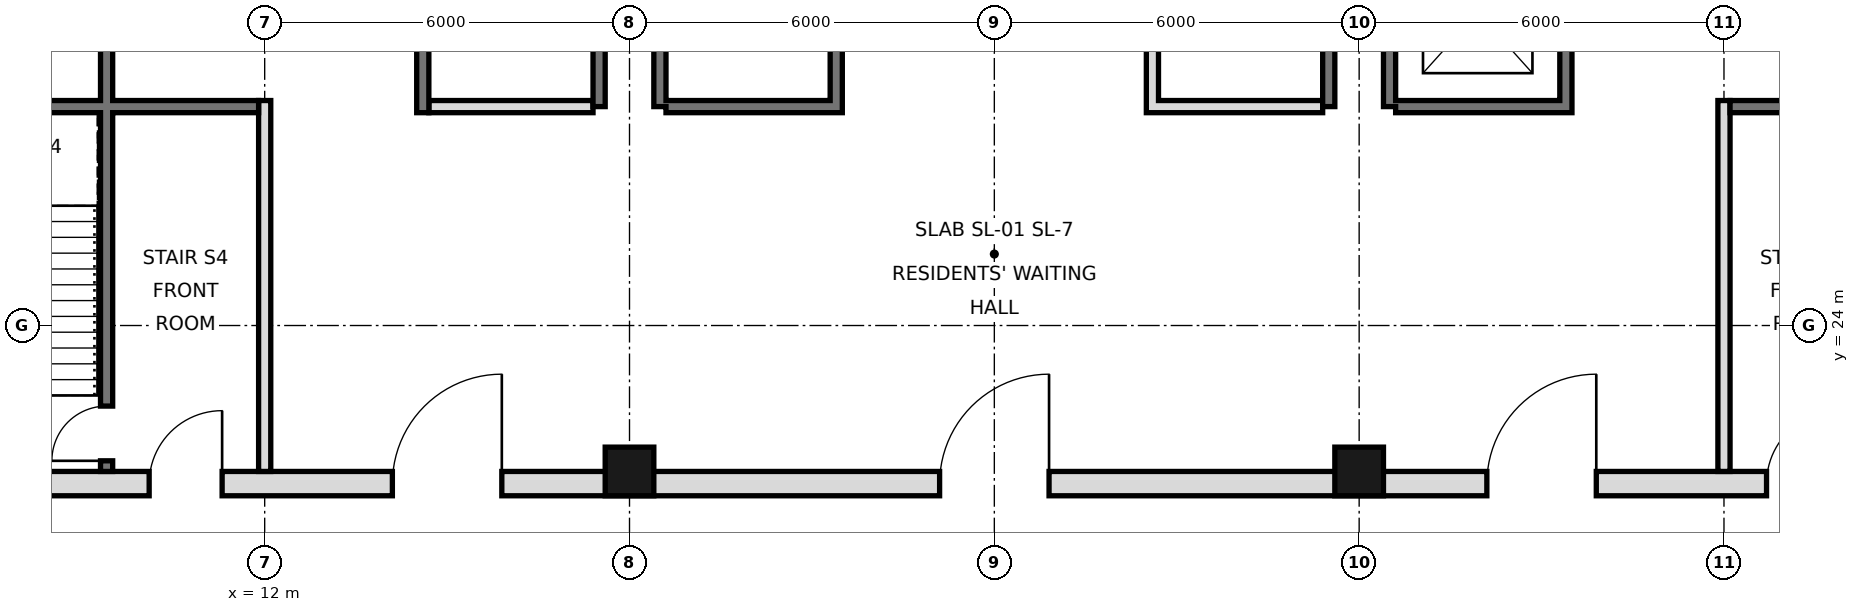
"""IFC4 building model, lengths in metres.
Left out: names, types, materials, properties, quantities, classifications, styles, units other than length and angle.
Written with IfcOpenShell. Run it as: python <this file> out.ifc"""

import sys

from ifc_helpers import new_model, si_unit, direction, frame, frame_2d, origin, origin_2d, place, context, subcontext, project, spatial, rectangle, hollow_rectangle, extrude, element, fill, save


model = new_model("IFC4")
c1 = context("Model", 3, precision=1e-05, world=origin(), true_north=direction((0.0, 1.0)))
c2 = subcontext(c1, "Body", "Model", "MODEL_VIEW")
j1 = project(units=[si_unit("LENGTHUNIT", "METRE"), si_unit("PLANEANGLEUNIT", "RADIAN")], contexts=[c1])
p1 = place(None, origin())
s1 = spatial("IfcSite", under=j1, at=p1, CompositionType="ELEMENT")
p2 = place(p1, origin())
s2 = spatial("IfcBuilding", under=s1, at=p2, CompositionType="ELEMENT")
p3 = place(p2, frame((0.0, 0.0, 181.6)))
s3 = spatial("IfcBuildingStorey", under=s2, at=p3, CompositionType="ELEMENT", Elevation=181.6)
for number, where, z_axis, x_axis in (
    (1, (18.0, 21.6, 0.0), (0.0, 0.0, 1.0), (1.0, 0.0, 0.0)),
    (2, (30.0, 21.6, 0.0), (0.0, 0.0, 1.0), (1.0, 0.0, 0.0)),
):
    element("IfcColumn", number, at=place(p3, frame(where, z_axis=z_axis, x_axis=x_axis)), inside=s3, PredefinedType="COLUMN", context=c2, shape_type="SweptSolid", body=[
        extrude(hollow_rectangle(XDim=0.8, YDim=0.8, WallThickness=0.045, at=origin_2d()), origin(), (0.0, 0.0, 1.0), 4.4),
    ])
for number, where, z_axis, x_axis in (
    (3, (17.5, 27.6, 0.0), (0.0, 0.0, 1.0), (0.0, 1.0, 0.0)),
    (4, (18.5, 27.6, 0.0), (0.0, 0.0, 1.0), (0.0, 1.0, 0.0)),
    (5, (29.5, 27.6, 0.0), (0.0, 0.0, 1.0), (0.0, 1.0, 0.0)),
    (6, (30.5, 27.6, 0.0), (0.0, 0.0, 1.0), (0.0, 1.0, 0.0)),
):
    element("IfcWall", number, at=place(p3, frame(where, z_axis=z_axis, x_axis=x_axis)), inside=s3, PredefinedType="SOLIDWALL", context=c2, shape_type="SweptSolid", body=[
        extrude(rectangle(XDim=17.5, YDim=0.2, at=frame_2d((8.75, 0.0))), origin(), (0.0, 0.0, 1.0), 4.1),
    ])
p4 = place(p3, frame((5.6, 21.4, 0.0), z_axis=(0.0, 0.0, 1.0), x_axis=(1.0, 0.0, 0.0)))
e7 = element("IfcWall", 7, at=p4, inside=s3, PredefinedType="SOLIDWALL", context=c2, shape_type="SweptSolid", body=[
    extrude(rectangle(XDim=36.8, YDim=0.4, at=frame_2d((18.4, 0.0))), origin(), (0.0, 0.0, 1.0), 4.1),
])
p5 = place(p4, frame((8.5, 0.0, 0.0)))
e8 = element("IfcOpeningElement", 8, at=p5, cuts=e7, PredefinedType="OPENING", context=c2, shape_type="SweptSolid", body=[
    extrude(rectangle(XDim=1.8, YDim=2.1, at=frame_2d((0.9, 1.05))), frame((0.0, 0.21, 0.0), z_axis=(0.0, -1.0, 0.0), x_axis=(1.0, 0.0, 0.0)), (0.0, 0.0, 1.0), 0.42),
])
p6 = place(p4, frame((17.5, 0.0, 0.0)))
e9 = element("IfcOpeningElement", 9, at=p6, cuts=e7, PredefinedType="OPENING", context=c2, shape_type="SweptSolid", body=[
    extrude(rectangle(XDim=1.8, YDim=2.1, at=frame_2d((0.9, 1.05))), frame((0.0, 0.21, 0.0), z_axis=(0.0, -1.0, 0.0), x_axis=(1.0, 0.0, 0.0)), (0.0, 0.0, 1.0), 0.42),
])
p7 = place(p4, frame((26.5, 0.0, 0.0)))
e10 = element("IfcOpeningElement", 10, at=p7, cuts=e7, PredefinedType="OPENING", context=c2, shape_type="SweptSolid", body=[
    extrude(rectangle(XDim=1.8, YDim=2.1, at=frame_2d((0.9, 1.05))), frame((0.0, 0.21, 0.0), z_axis=(0.0, -1.0, 0.0), x_axis=(1.0, 0.0, 0.0)), (0.0, 0.0, 1.0), 0.42),
])
p8 = place(p4, frame((4.5, 0.0, 0.0)))
e11 = element("IfcOpeningElement", 11, at=p8, cuts=e7, PredefinedType="OPENING", context=c2, shape_type="SweptSolid", body=[
    extrude(rectangle(XDim=1.2, YDim=2.1, at=frame_2d((0.6, 1.05))), frame((0.0, 0.21, 0.0), z_axis=(0.0, -1.0, 0.0), x_axis=(1.0, 0.0, 0.0)), (0.0, 0.0, 1.0), 0.42),
])
p9 = place(p4, frame((31.1, 0.0, 0.0)))
e12 = element("IfcOpeningElement", 12, at=p9, cuts=e7, PredefinedType="OPENING", context=c2, shape_type="SweptSolid", body=[
    extrude(rectangle(XDim=1.2, YDim=2.1, at=frame_2d((0.6, 1.05))), frame((0.0, 0.21, 0.0), z_axis=(0.0, -1.0, 0.0), x_axis=(1.0, 0.0, 0.0)), (0.0, 0.0, 1.0), 0.42),
])
p10 = place(p3, frame((12.0, 21.6, 0.0), z_axis=(0.0, 0.0, 1.0), x_axis=(0.0, 1.0, 0.0)))
e13 = element("IfcWall", 13, at=p10, inside=s3, PredefinedType="PARTITIONING", context=c2, shape_type="SweptSolid", body=[
    extrude(rectangle(XDim=6.1, YDim=0.2, at=frame_2d((3.05, 0.0))), origin(), (0.0, 0.0, 1.0), 4.1),
])
p11 = place(p3, frame((14.6, 27.5, 0.0), z_axis=(0.0, 0.0, 1.0), x_axis=(0.0, 1.0, 0.0)))
e14 = element("IfcWall", 14, at=p11, inside=s3, PredefinedType="SOLIDWALL", context=c2, shape_type="SweptSolid", body=[
    extrude(rectangle(XDim=17.5, YDim=0.2, at=frame_2d((8.75, 0.0))), origin(), (0.0, 0.0, 1.0), 4.1),
])
p12 = place(p11, frame((15.4, 0.0, 0.0)))
e15 = element("IfcOpeningElement", 15, at=p12, cuts=e14, PredefinedType="OPENING", context=c2, shape_type="SweptSolid", body=[
    extrude(rectangle(XDim=1.1, YDim=2.1, at=frame_2d((0.55, 1.05))), frame((0.0, 0.11, 0.0), z_axis=(0.0, -1.0, 0.0), x_axis=(1.0, 0.0, 0.0)), (0.0, 0.0, 1.0), 0.22),
])
p13 = place(p11, frame((2.7, 0.0, 0.0)))
e16 = element("IfcOpeningElement", 16, at=p13, cuts=e14, PredefinedType="OPENING", context=c2, shape_type="SweptSolid", body=[
    extrude(rectangle(XDim=1.0, YDim=2.1, at=frame_2d((0.5, 1.05))), frame((0.0, 0.11, 0.0), z_axis=(0.0, -1.0, 0.0), x_axis=(1.0, 0.0, 0.0)), (0.0, 0.0, 1.0), 0.22),
])
p14 = place(p11, frame((9.9, 0.0, 0.0)))
e17 = element("IfcOpeningElement", 17, at=p14, cuts=e14, PredefinedType="OPENING", context=c2, shape_type="SweptSolid", body=[
    extrude(rectangle(XDim=0.9, YDim=2.1, at=frame_2d((0.45, 1.05))), frame((0.0, 0.11, 0.0), z_axis=(0.0, -1.0, 0.0), x_axis=(1.0, 0.0, 0.0)), (0.0, 0.0, 1.0), 0.22),
])
p15 = place(p3, frame((21.4, 27.5, 0.0), z_axis=(0.0, 0.0, 1.0), x_axis=(0.0, 1.0, 0.0)))
e18 = element("IfcWall", 18, at=p15, inside=s3, PredefinedType="SOLIDWALL", context=c2, shape_type="SweptSolid", body=[
    extrude(rectangle(XDim=17.5, YDim=0.2, at=frame_2d((8.75, 0.0))), origin(), (0.0, 0.0, 1.0), 4.1),
])
p16 = place(p15, frame((9.8, 0.0, 0.0)))
e19 = element("IfcOpeningElement", 19, at=p16, cuts=e18, PredefinedType="OPENING", context=c2, shape_type="SweptSolid", body=[
    extrude(rectangle(XDim=1.0, YDim=2.1, at=frame_2d((0.5, 1.05))), frame((0.0, 0.11, 0.0), z_axis=(0.0, -1.0, 0.0), x_axis=(1.0, 0.0, 0.0)), (0.0, 0.0, 1.0), 0.22),
])
p17 = place(p15, frame((7.4, 0.0, 0.0)))
e20 = element("IfcOpeningElement", 20, at=p17, cuts=e18, PredefinedType="OPENING", context=c2, shape_type="SweptSolid", body=[
    extrude(rectangle(XDim=0.9, YDim=2.1, at=frame_2d((0.45, 1.05))), frame((0.0, 0.11, 0.0), z_axis=(0.0, -1.0, 0.0), x_axis=(1.0, 0.0, 0.0)), (0.0, 0.0, 1.0), 0.22),
])
p18 = place(p3, frame((26.6, 27.5, 0.0), z_axis=(0.0, 0.0, 1.0), x_axis=(0.0, 1.0, 0.0)))
e21 = element("IfcWall", 21, at=p18, inside=s3, PredefinedType="SOLIDWALL", context=c2, shape_type="SweptSolid", body=[
    extrude(rectangle(XDim=17.5, YDim=0.2, at=frame_2d((8.75, 0.0))), origin(), (0.0, 0.0, 1.0), 4.1),
])
p19 = place(p18, frame((4.3, 0.0, 0.0)))
e22 = element("IfcOpeningElement", 22, at=p19, cuts=e21, PredefinedType="OPENING", context=c2, shape_type="SweptSolid", body=[
    extrude(rectangle(XDim=0.9, YDim=2.1, at=frame_2d((0.45, 1.05))), frame((0.0, 0.11, 0.0), z_axis=(0.0, -1.0, 0.0), x_axis=(1.0, 0.0, 0.0)), (0.0, 0.0, 1.0), 0.22),
])
p20 = place(p18, frame((10.35, 0.0, 0.0)))
e23 = element("IfcOpeningElement", 23, at=p20, cuts=e21, PredefinedType="OPENING", context=c2, shape_type="SweptSolid", body=[
    extrude(rectangle(XDim=1.0, YDim=2.1, at=frame_2d((0.5, 1.05))), frame((0.0, 0.11, 0.0), z_axis=(0.0, -1.0, 0.0), x_axis=(1.0, 0.0, 0.0)), (0.0, 0.0, 1.0), 0.22),
])
p21 = place(p18, frame((14.575, 0.0, 0.0)))
e24 = element("IfcOpeningElement", 24, at=p21, cuts=e21, PredefinedType="OPENING", context=c2, shape_type="SweptSolid", body=[
    extrude(rectangle(XDim=1.0, YDim=2.1, at=frame_2d((0.5, 1.05))), frame((0.0, 0.11, 0.0), z_axis=(0.0, -1.0, 0.0), x_axis=(1.0, 0.0, 0.0)), (0.0, 0.0, 1.0), 0.22),
])
p22 = place(p3, frame((33.4, 27.5, 0.0), z_axis=(0.0, 0.0, 1.0), x_axis=(0.0, 1.0, 0.0)))
e25 = element("IfcWall", 25, at=p22, inside=s3, PredefinedType="SOLIDWALL", context=c2, shape_type="SweptSolid", body=[
    extrude(rectangle(XDim=17.5, YDim=0.2, at=frame_2d((8.75, 0.0))), origin(), (0.0, 0.0, 1.0), 4.1),
])
p23 = place(p22, frame((1.1, 0.0, 0.0)))
e26 = element("IfcOpeningElement", 26, at=p23, cuts=e25, PredefinedType="OPENING", context=c2, shape_type="SweptSolid", body=[
    extrude(rectangle(XDim=1.1, YDim=2.1, at=frame_2d((0.55, 1.05))), frame((0.0, 0.11, 0.0), z_axis=(0.0, -1.0, 0.0), x_axis=(1.0, 0.0, 0.0)), (0.0, 0.0, 1.0), 0.22),
])
p24 = place(p22, frame((4.2, 0.0, 0.0)))
e27 = element("IfcOpeningElement", 27, at=p24, cuts=e25, PredefinedType="OPENING", context=c2, shape_type="SweptSolid", body=[
    extrude(rectangle(XDim=1.1, YDim=2.1, at=frame_2d((0.55, 1.05))), frame((0.0, 0.11, 0.0), z_axis=(0.0, -1.0, 0.0), x_axis=(1.0, 0.0, 0.0)), (0.0, 0.0, 1.0), 0.22),
])
p25 = place(p22, frame((15.4, 0.0, 0.0)))
e28 = element("IfcOpeningElement", 28, at=p25, cuts=e25, PredefinedType="OPENING", context=c2, shape_type="SweptSolid", body=[
    extrude(rectangle(XDim=1.1, YDim=2.1, at=frame_2d((0.55, 1.05))), frame((0.0, 0.11, 0.0), z_axis=(0.0, -1.0, 0.0), x_axis=(1.0, 0.0, 0.0)), (0.0, 0.0, 1.0), 0.22),
])
p26 = place(p22, frame((9.9, 0.0, 0.0)))
e29 = element("IfcOpeningElement", 29, at=p26, cuts=e25, PredefinedType="OPENING", context=c2, shape_type="SweptSolid", body=[
    extrude(rectangle(XDim=0.9, YDim=2.1, at=frame_2d((0.45, 1.05))), frame((0.0, 0.11, 0.0), z_axis=(0.0, -1.0, 0.0), x_axis=(1.0, 0.0, 0.0)), (0.0, 0.0, 1.0), 0.22),
])
p27 = place(p3, frame((36.0, 21.6, 0.0), z_axis=(0.0, 0.0, 1.0), x_axis=(0.0, 1.0, 0.0)))
e30 = element("IfcWall", 30, at=p27, inside=s3, PredefinedType="PARTITIONING", context=c2, shape_type="SweptSolid", body=[
    extrude(rectangle(XDim=6.1, YDim=0.2, at=frame_2d((3.05, 0.0))), origin(), (0.0, 0.0, 1.0), 4.1),
])
p28 = place(p3, frame((9.4, 21.6, 0.0), z_axis=(0.0, 0.0, 1.0), x_axis=(0.0, 1.0, 0.0)))
e31 = element("IfcWall", 31, at=p28, inside=s3, PredefinedType="SOLIDWALL", context=c2, shape_type="SweptSolid", body=[
    extrude(rectangle(XDim=23.4, YDim=0.2, at=frame_2d((11.7, 0.0))), origin(), (0.0, 0.0, 1.0), 4.1),
])
p29 = place(p28, frame((7.7, 0.0, 0.0)))
e32 = element("IfcOpeningElement", 32, at=p29, cuts=e31, PredefinedType="OPENING", context=c2, shape_type="SweptSolid", body=[
    extrude(rectangle(XDim=1.0, YDim=2.1, at=frame_2d((0.5, 1.05))), frame((0.0, 0.11, 0.0), z_axis=(0.0, -1.0, 0.0), x_axis=(1.0, 0.0, 0.0)), (0.0, 0.0, 1.0), 0.22),
])
p30 = place(p28, frame((12.35, 0.0, 0.0)))
e33 = element("IfcOpeningElement", 33, at=p30, cuts=e31, PredefinedType="OPENING", context=c2, shape_type="SweptSolid", body=[
    extrude(rectangle(XDim=1.0, YDim=2.1, at=frame_2d((0.5, 1.05))), frame((0.0, 0.11, 0.0), z_axis=(0.0, -1.0, 0.0), x_axis=(1.0, 0.0, 0.0)), (0.0, 0.0, 1.0), 0.22),
])
p31 = place(p28, frame((15.7, 0.0, 0.0)))
e34 = element("IfcOpeningElement", 34, at=p31, cuts=e31, PredefinedType="OPENING", context=c2, shape_type="SweptSolid", body=[
    extrude(rectangle(XDim=1.0, YDim=2.1, at=frame_2d((0.5, 1.05))), frame((0.0, 0.11, 0.0), z_axis=(0.0, -1.0, 0.0), x_axis=(1.0, 0.0, 0.0)), (0.0, 0.0, 1.0), 0.22),
])
p32 = place(p28, frame((0.175, 0.0, 0.0)))
e35 = element("IfcOpeningElement", 35, at=p32, cuts=e31, PredefinedType="OPENING", context=c2, shape_type="SweptSolid", body=[
    extrude(rectangle(XDim=0.9, YDim=2.1, at=frame_2d((0.45, 1.05))), frame((0.0, 0.11, 0.0), z_axis=(0.0, -1.0, 0.0), x_axis=(1.0, 0.0, 0.0)), (0.0, 0.0, 1.0), 0.22),
])
p33 = place(p3, frame((14.7, 27.6, 0.0), z_axis=(0.0, 0.0, 1.0), x_axis=(1.0, 0.0, 0.0)))
e36 = element("IfcWall", 36, at=p33, inside=s3, PredefinedType="PARTITIONING", context=c2, shape_type="SweptSolid", body=[
    extrude(rectangle(XDim=2.7, YDim=0.2, at=frame_2d((1.35, 0.0))), origin(), (0.0, 0.0, 1.0), 4.1),
])
for number, where, z_axis, x_axis in (
    (37, (18.6, 27.6, 0.0), (0.0, 0.0, 1.0), (1.0, 0.0, 0.0)),
    (38, (26.7, 27.6, 0.0), (0.0, 0.0, 1.0), (1.0, 0.0, 0.0)),
    (39, (30.6, 27.6, 0.0), (0.0, 0.0, 1.0), (1.0, 0.0, 0.0)),
):
    element("IfcWall", number, at=place(p3, frame(where, z_axis=z_axis, x_axis=x_axis)), inside=s3, PredefinedType="SOLIDWALL", context=c2, shape_type="SweptSolid", body=[
        extrude(rectangle(XDim=2.7, YDim=0.2, at=frame_2d((1.35, 0.0))), origin(), (0.0, 0.0, 1.0), 4.1),
    ])
for number, where, z_axis, x_axis in (
    (40, (36.1, 27.6, 0.0), (0.0, 0.0, 1.0), (1.0, 0.0, 0.0)),
    (41, (6.6, 27.6, 0.0), (0.0, 0.0, 1.0), (1.0, 0.0, 0.0)),
):
    element("IfcWall", number, at=place(p3, frame(where, z_axis=z_axis, x_axis=x_axis)), inside=s3, PredefinedType="SOLIDWALL", context=c2, shape_type="SweptSolid", body=[
        extrude(rectangle(XDim=5.3, YDim=0.2, at=frame_2d((2.65, 0.0))), origin(), (0.0, 0.0, 1.0), 4.1),
    ])
p34 = place(p5, frame((1.8, 0.0, 0.0), z_axis=(0.0, 0.0, 1.0), x_axis=(-1.0, 0.0, 0.0)))
e42 = element("IfcDoor", 42, at=p34, inside=s3, OperationType="SINGLE_SWING_LEFT", PredefinedType="DOOR", context=c2, shape_type="SweptSolid", body=[
    extrude(rectangle(XDim=1.8, YDim=2.1, at=frame_2d((0.9, 1.05))), frame((0.0, 0.025, 0.0), z_axis=(0.0, -1.0, 0.0), x_axis=(1.0, 0.0, 0.0)), (0.0, 0.0, 1.0), 0.05),
])
fill(e8, e42)
p35 = place(p6, frame((1.8, 0.0, 0.0), z_axis=(0.0, 0.0, 1.0), x_axis=(-1.0, 0.0, 0.0)))
e43 = element("IfcDoor", 43, at=p35, inside=s3, OperationType="SINGLE_SWING_LEFT", PredefinedType="DOOR", context=c2, shape_type="SweptSolid", body=[
    extrude(rectangle(XDim=1.8, YDim=2.1, at=frame_2d((0.9, 1.05))), frame((0.0, 0.025, 0.0), z_axis=(0.0, -1.0, 0.0), x_axis=(1.0, 0.0, 0.0)), (0.0, 0.0, 1.0), 0.05),
])
fill(e9, e43)
p36 = place(p7, frame((1.8, 0.0, 0.0), z_axis=(0.0, 0.0, 1.0), x_axis=(-1.0, 0.0, 0.0)))
e44 = element("IfcDoor", 44, at=p36, inside=s3, OperationType="SINGLE_SWING_LEFT", PredefinedType="DOOR", context=c2, shape_type="SweptSolid", body=[
    extrude(rectangle(XDim=1.8, YDim=2.1, at=frame_2d((0.9, 1.05))), frame((0.0, 0.025, 0.0), z_axis=(0.0, -1.0, 0.0), x_axis=(1.0, 0.0, 0.0)), (0.0, 0.0, 1.0), 0.05),
])
fill(e10, e44)
p37 = place(p8, frame((1.2, 0.0, 0.0), z_axis=(0.0, 0.0, 1.0), x_axis=(-1.0, 0.0, 0.0)))
e45 = element("IfcDoor", 45, at=p37, inside=s3, OperationType="SINGLE_SWING_LEFT", PredefinedType="DOOR", context=c2, shape_type="SweptSolid", body=[
    extrude(rectangle(XDim=1.2, YDim=2.1, at=frame_2d((0.6, 1.05))), frame((0.0, 0.025, 0.0), z_axis=(0.0, -1.0, 0.0), x_axis=(1.0, 0.0, 0.0)), (0.0, 0.0, 1.0), 0.05),
])
fill(e11, e45)
p38 = place(p9, frame((1.2, 0.0, 0.0), z_axis=(0.0, 0.0, 1.0), x_axis=(-1.0, 0.0, 0.0)))
e46 = element("IfcDoor", 46, at=p38, inside=s3, OperationType="SINGLE_SWING_LEFT", PredefinedType="DOOR", context=c2, shape_type="SweptSolid", body=[
    extrude(rectangle(XDim=1.2, YDim=2.1, at=frame_2d((0.6, 1.05))), frame((0.0, 0.025, 0.0), z_axis=(0.0, -1.0, 0.0), x_axis=(1.0, 0.0, 0.0)), (0.0, 0.0, 1.0), 0.05),
])
fill(e12, e46)
p39 = place(p32, origin())
e47 = element("IfcDoor", 47, at=p39, inside=s3, OperationType="SINGLE_SWING_LEFT", PredefinedType="DOOR", context=c2, shape_type="SweptSolid", body=[
    extrude(rectangle(XDim=0.9, YDim=2.1, at=frame_2d((0.45, 1.05))), frame((0.0, 0.025, 0.0), z_axis=(0.0, -1.0, 0.0), x_axis=(1.0, 0.0, 0.0)), (0.0, 0.0, 1.0), 0.05),
])
fill(e35, e47)
save(model, sys.argv[1])
